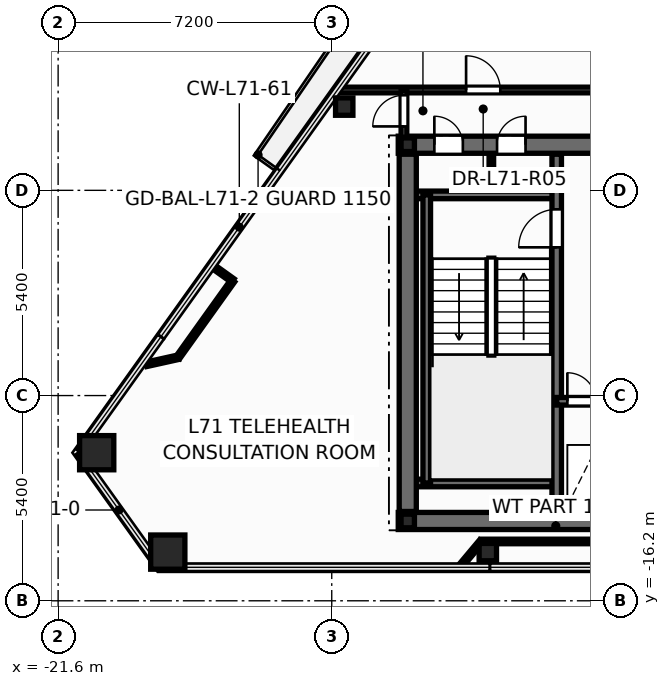
"""IFC4 building model, lengths in metres.
Left out: names, types, materials, properties, quantities, classifications, styles, units other than length and angle.
Written with IfcOpenShell. Run it as: python <this file> out.ifc"""

import sys

from ifc_helpers import new_model, si_unit, direction, frame, frame_2d, origin, origin_2d, place, context, subcontext, project, spatial, rectangle, hollow_rectangle, hollow_circle, i_section, extrude, element, fill, save


model = new_model("IFC4")
c1 = context("Model", 3, precision=1e-05, world=origin(), true_north=direction((0.0, 1.0)))
c2 = subcontext(c1, "Body", "Model", "MODEL_VIEW")
j1 = project(units=[si_unit("LENGTHUNIT", "METRE"), si_unit("PLANEANGLEUNIT", "RADIAN")], contexts=[c1])
p1 = place(None, origin())
s1 = spatial("IfcSite", under=j1, at=p1, CompositionType="ELEMENT")
p2 = place(p1, origin())
s2 = spatial("IfcBuilding", under=s1, at=p2, CompositionType="ELEMENT")
p3 = place(p2, frame((0.0, 0.0, 270.6)))
s3 = spatial("IfcBuildingStorey", under=s2, at=p3, CompositionType="ELEMENT", Elevation=270.6)
for number, where, z_axis, x_axis in (
    (1, (-20.585, -12.303, 0.0), (0.0, 0.0, 1.0), (1.0, 0.0, 0.0)),
    (2, (-18.714, -14.919, 0.0), (0.0, 0.0, 1.0), (1.0, 0.0, 0.0)),
):
    element("IfcColumn", number, at=place(p3, frame(where, z_axis=z_axis, x_axis=x_axis)), inside=s3, PredefinedType="COLUMN", context=c2, shape_type="SweptSolid", body=[
        extrude(hollow_rectangle(XDim=0.9, YDim=0.9, WallThickness=0.04, at=origin_2d()), origin(), (0.0, 0.0, 1.0), 3.6),
    ])
for number, where, z_axis, x_axis in (
    (3, (-10.293, -14.919, 0.0), (0.0, 0.0, 1.0), (1.0, 0.0, 0.0)),
    (4, (-14.072, -3.196, 0.0), (0.0, 0.0, 1.0), (1.0, 0.0, 0.0)),
):
    element("IfcColumn", number, at=place(p3, frame(where, z_axis=z_axis, x_axis=x_axis)), inside=s3, PredefinedType="COLUMN", context=c2, shape_type="SweptSolid", body=[
        extrude(hollow_circle(Radius=0.229, WallThickness=0.016, at=origin_2d()), origin(), (0.0, 0.0, 1.0), 3.6),
    ])
for number, where, z_axis, x_axis in (
    (5, (-12.4, -14.1, 0.0), (0.0, 0.0, 1.0), (1.0, 0.0, 0.0)),
    (6, (-12.4, -4.2, 0.0), (0.0, 0.0, 1.0), (1.0, 0.0, 0.0)),
):
    element("IfcColumn", number, at=place(p3, frame(where, z_axis=z_axis, x_axis=x_axis)), inside=s3, PredefinedType="COLUMN", context=c2, shape_type="SweptSolid", body=[
        extrude(i_section(OverallWidth=0.352, OverallDepth=0.359, WebThickness=0.018, FlangeThickness=0.026, at=origin_2d()), origin(), (0.0, 0.0, 1.0), 3.6),
    ])
p4 = place(p3, frame((-10.2, -5.52, 0.0), z_axis=(0.0, 0.0, 1.0), x_axis=(0.0, 1.0, 0.0)))
e7 = element("IfcWall", 7, at=p4, inside=s3, PredefinedType="PARTITIONING", context=c2, shape_type="SweptSolid", body=[
    extrude(rectangle(XDim=1.12, YDim=0.12, at=frame_2d((0.56, 0.0))), origin(), (0.0, 0.0, 1.0), 3.345),
])
p5 = place(p3, frame((-12.65, -14.1, 0.0), z_axis=(0.0, 0.0, 1.0), x_axis=(1.0, 0.0, 0.0)))
e8 = element("IfcWall", 8, at=p5, inside=s3, PredefinedType="SHEAR", context=c2, shape_type="SweptSolid", body=[
    extrude(rectangle(XDim=25.3, YDim=0.45, at=frame_2d((12.65, 0.0))), origin(), (0.0, 0.0, 1.0), 3.6),
])
p6 = place(p3, frame((-12.65, -4.2, 0.0), z_axis=(0.0, 0.0, 1.0), x_axis=(1.0, 0.0, 0.0)))
e9 = element("IfcWall", 9, at=p6, inside=s3, PredefinedType="SHEAR", context=c2, shape_type="SweptSolid", body=[
    extrude(rectangle(XDim=25.3, YDim=0.45, at=frame_2d((12.65, 0.0))), origin(), (0.0, 0.0, 1.0), 3.6),
])
p7 = place(p6, frame((0.95, 0.0, 0.0)))
e10 = element("IfcOpeningElement", 10, at=p7, cuts=e9, PredefinedType="OPENING", context=c2, shape_type="SweptSolid", body=[
    extrude(rectangle(XDim=0.756, YDim=2.054, at=frame_2d((0.375, 1.027))), frame((0.0, 0.235, 0.0), z_axis=(0.0, -1.0, 0.0), x_axis=(1.0, 0.0, 0.0)), (0.0, 0.0, 1.0), 0.47),
])
p8 = place(p6, frame((2.6, 0.0, 0.0)))
e11 = element("IfcOpeningElement", 11, at=p8, cuts=e9, PredefinedType="OPENING", context=c2, shape_type="SweptSolid", body=[
    extrude(rectangle(XDim=0.756, YDim=2.054, at=frame_2d((0.375, 1.027))), frame((0.0, 0.235, 0.0), z_axis=(0.0, -1.0, 0.0), x_axis=(1.0, 0.0, 0.0)), (0.0, 0.0, 1.0), 0.47),
])
p9 = place(p6, frame((21.85, 0.0, 0.0)))
e12 = element("IfcOpeningElement", 12, at=p9, cuts=e9, PredefinedType="OPENING", context=c2, shape_type="SweptSolid", body=[
    extrude(rectangle(XDim=0.756, YDim=2.054, at=frame_2d((0.375, 1.027))), frame((0.0, 0.235, 0.0), z_axis=(0.0, -1.0, 0.0), x_axis=(1.0, 0.0, 0.0)), (0.0, 0.0, 1.0), 0.47),
])
p10 = place(p6, frame((23.5, 0.0, 0.0)))
e13 = element("IfcOpeningElement", 13, at=p10, cuts=e9, PredefinedType="OPENING", context=c2, shape_type="SweptSolid", body=[
    extrude(rectangle(XDim=0.756, YDim=2.054, at=frame_2d((0.375, 1.027))), frame((0.0, 0.235, 0.0), z_axis=(0.0, -1.0, 0.0), x_axis=(1.0, 0.0, 0.0)), (0.0, 0.0, 1.0), 0.47),
])
p11 = place(p6, frame((5.85, 0.0, 0.0)))
e14 = element("IfcOpeningElement", 14, at=p11, cuts=e9, PredefinedType="OPENING", context=c2, shape_type="SweptSolid", body=[
    extrude(rectangle(XDim=1.006, YDim=2.104, at=frame_2d((0.5, 1.052))), frame((0.0, 0.235, 0.0), z_axis=(0.0, -1.0, 0.0), x_axis=(1.0, 0.0, 0.0)), (0.0, 0.0, 1.0), 0.47),
])
p12 = place(p6, frame((10.35, 0.0, 0.0)))
e15 = element("IfcOpeningElement", 15, at=p12, cuts=e9, PredefinedType="OPENING", context=c2, shape_type="SweptSolid", body=[
    extrude(rectangle(XDim=1.406, YDim=2.154, at=frame_2d((0.7, 1.077))), frame((0.0, 0.235, 0.0), z_axis=(0.0, -1.0, 0.0), x_axis=(1.0, 0.0, 0.0)), (0.0, 0.0, 1.0), 0.47),
])
p13 = place(p6, frame((18.45, 0.0, 0.0)))
e16 = element("IfcOpeningElement", 16, at=p13, cuts=e9, PredefinedType="OPENING", context=c2, shape_type="SweptSolid", body=[
    extrude(rectangle(XDim=1.006, YDim=2.104, at=frame_2d((0.5, 1.052))), frame((0.0, 0.235, 0.0), z_axis=(0.0, -1.0, 0.0), x_axis=(1.0, 0.0, 0.0)), (0.0, 0.0, 1.0), 0.47),
])
for number, where, z_axis, x_axis in (
    (17, (-12.35, -5.52, 0.0), (0.0, 0.0, 1.0), (1.0, 0.0, 0.0)),
    (18, (-12.35, -13.1, 0.0), (0.0, 0.0, 1.0), (1.0, 0.0, 0.0)),
):
    element("IfcWall", number, at=place(p3, frame(where, z_axis=z_axis, x_axis=x_axis)), inside=s3, PredefinedType="SOLIDWALL", context=c2, shape_type="SweptSolid", body=[
        extrude(rectangle(XDim=3.87, YDim=0.2, at=frame_2d((1.935, 0.0))), origin(), (0.0, 0.0, 1.0), 3.6),
    ])
p14 = place(p3, frame((-11.9, -13.1, 0.0), z_axis=(0.0, 0.0, 1.0), x_axis=(0.0, 1.0, 0.0)))
e19 = element("IfcWall", 19, at=p14, inside=s3, PredefinedType="SOLIDWALL", context=c2, shape_type="SweptSolid", body=[
    extrude(rectangle(XDim=7.58, YDim=0.2, at=frame_2d((3.79, 0.0))), origin(), (0.0, 0.0, 1.0), 3.6),
])
p15 = place(p3, frame((-8.48, -13.85, 0.0), z_axis=(0.0, 0.0, 1.0), x_axis=(0.0, 1.0, 0.0)))
e20 = element("IfcWall", 20, at=p15, inside=s3, PredefinedType="SHEAR", context=c2, shape_type="SweptSolid", body=[
    extrude(rectangle(XDim=9.4, YDim=0.25, at=frame_2d((4.7, 0.0))), origin(), (0.0, 0.0, 1.0), 3.6),
])
p16 = place(p15, frame((6.95, 0.0, 0.0)))
e21 = element("IfcOpeningElement", 21, at=p16, cuts=e20, PredefinedType="OPENING", context=c2, shape_type="SweptSolid", body=[
    extrude(rectangle(XDim=1.006, YDim=2.104, at=frame_2d((0.5, 1.052))), frame((0.0, 0.135, 0.0), z_axis=(0.0, -1.0, 0.0), x_axis=(1.0, 0.0, 0.0)), (0.0, 0.0, 1.0), 0.27),
])
p17 = place(p3, frame((-8.48, -10.95, 0.0), z_axis=(0.0, 0.0, 1.0), x_axis=(1.0, 0.0, 0.0)))
e22 = element("IfcWall", 22, at=p17, inside=s3, PredefinedType="SOLIDWALL", context=c2, shape_type="SweptSolid", body=[
    extrude(rectangle(XDim=3.36, YDim=0.2, at=frame_2d((1.68, 0.0))), origin(), (0.0, 0.0, 1.0), 3.6),
])
p18 = place(p17, frame((0.28, 0.0, 0.0)))
e23 = element("IfcOpeningElement", 23, at=p18, cuts=e22, PredefinedType="OPENING", context=c2, shape_type="SweptSolid", body=[
    extrude(rectangle(XDim=0.756, YDim=2.054, at=frame_2d((0.375, 1.027))), frame((0.0, 0.11, 0.0), z_axis=(0.0, -1.0, 0.0), x_axis=(1.0, 0.0, 0.0)), (0.0, 0.0, 1.0), 0.22),
])
p19 = place(p17, frame((1.85, 0.0, 0.0)))
e24 = element("IfcOpeningElement", 24, at=p19, cuts=e22, PredefinedType="OPENING", context=c2, shape_type="SweptSolid", body=[
    extrude(rectangle(XDim=1.106, YDim=2.104, at=frame_2d((0.55, 1.052))), frame((0.0, 0.11, 0.0), z_axis=(0.0, -1.0, 0.0), x_axis=(1.0, 0.0, 0.0)), (0.0, 0.0, 1.0), 0.22),
])
p20 = place(p3, frame((-12.4, -13.85, 0.0), z_axis=(0.0, 0.0, 1.0), x_axis=(0.0, 1.0, 0.0)))
e25 = element("IfcWall", 25, at=p20, inside=s3, PredefinedType="SHEAR", context=c2, shape_type="SweptSolid", body=[
    extrude(rectangle(XDim=9.4, YDim=0.45, at=frame_2d((4.7, 0.0))), origin(), (0.0, 0.0, 1.0), 3.6),
])
p21 = place(p3, frame((-14.251, -2.76, 0.0), z_axis=(0.0, 0.0, 1.0), x_axis=(1.0, 0.0, 0.0)))
e26 = element("IfcWall", 26, at=p21, inside=s3, PredefinedType="PARTITIONING", context=c2, shape_type="SweptSolid", body=[
    extrude(rectangle(XDim=9.351, YDim=0.15, at=frame_2d((4.676, 0.0))), origin(), (0.0, 0.0, 1.0), 2.32),
])
p22 = place(p21, frame((3.386, 0.0, 0.0)))
e27 = element("IfcOpeningElement", 27, at=p22, cuts=e26, PredefinedType="OPENING", context=c2, shape_type="SweptSolid", body=[
    extrude(rectangle(XDim=0.906, YDim=2.104, at=frame_2d((0.45, 1.052))), frame((0.0, 0.085, 0.0), z_axis=(0.0, -1.0, 0.0), x_axis=(1.0, 0.0, 0.0)), (0.0, 0.0, 1.0), 0.17),
])
p23 = place(p3, frame((-10.468, -14.639, 0.0), z_axis=(0.0, 0.0, 1.0), x_axis=(1.0, 0.0, 0.0)))
e28 = element("IfcWall", 28, at=p23, inside=s3, PredefinedType="PARTITIONING", context=c2, shape_type="SweptSolid", body=[
    extrude(rectangle(XDim=3.926, YDim=0.12, at=frame_2d((1.963, 0.0))), origin(), (0.0, 0.0, 1.0), 3.345),
])
p24 = place(p3, frame((-17.003, -7.776, 0.0), z_axis=(0.0, 0.0, 1.0), x_axis=(-0.581731659236, -0.813380769777, 0.0)))
e29 = element("IfcWall", 29, at=p24, inside=s3, PredefinedType="PARTITIONING", context=c2, shape_type="SweptSolid", body=[
    extrude(rectangle(XDim=2.48, YDim=0.12, at=frame_2d((1.24, 0.0))), origin(), (0.0, 0.0, 1.0), 2.32),
])
p25 = place(p3, frame((-12.5, -4.24, 0.0), z_axis=(0.0, 0.0, 1.0), x_axis=(0.0, 1.0, 0.0)))
e30 = element("IfcWall", 30, at=p25, inside=s3, PredefinedType="PARTITIONING", context=c2, shape_type="SweptSolid", body=[
    extrude(rectangle(XDim=1.48, YDim=0.15, at=frame_2d((0.74, 0.0))), origin(), (0.0, 0.0, 1.0), 2.32),
])
p26 = place(p25, frame((0.522, 0.0, 0.0)))
e31 = element("IfcOpeningElement", 31, at=p26, cuts=e30, PredefinedType="OPENING", context=c2, shape_type="SweptSolid", body=[
    extrude(rectangle(XDim=0.826, YDim=2.104, at=frame_2d((0.41, 1.052))), frame((0.0, 0.085, 0.0), z_axis=(0.0, -1.0, 0.0), x_axis=(1.0, 0.0, 0.0)), (0.0, 0.0, 1.0), 0.17),
])
p27 = place(p3, frame((-11.03, -15.309, 0.0), z_axis=(0.0, 0.0, 1.0), x_axis=(0.642543514204, 0.766249197295, 0.0)))
e32 = element("IfcWall", 32, at=p27, inside=s3, PredefinedType="PARTITIONING", context=c2, shape_type="SweptSolid", body=[
    extrude(rectangle(XDim=0.874, YDim=0.12, at=frame_2d((0.437, 0.0))), origin(), (0.0, 0.0, 1.0), 2.863),
])
p28 = place(p3, frame((-18.445, -9.793, 0.0), z_axis=(0.0, 0.0, 1.0), x_axis=(-0.976274708093, -0.216535665279, 0.0)))
e33 = element("IfcWall", 33, at=p28, inside=s3, PredefinedType="PARTITIONING", context=c2, shape_type="SweptSolid", body=[
    extrude(rectangle(XDim=0.851, YDim=0.12, at=frame_2d((0.426, 0.0))), origin(), (0.0, 0.0, 1.0), 2.863),
])
p29 = place(p3, frame((-17.548, -7.386, 0.0), z_axis=(0.0, 0.0, 1.0), x_axis=(0.813265440227, -0.581892879947, 0.0)))
e34 = element("IfcWall", 34, at=p29, inside=s3, PredefinedType="PARTITIONING", context=c2, shape_type="SweptSolid", body=[
    extrude(rectangle(XDim=0.67, YDim=0.12, at=frame_2d((0.335, 0.0))), origin(), (0.0, 0.0, 1.0), 2.863),
])
p30 = place(p16, origin())
e35 = element("IfcDoor", 35, at=p30, inside=s3, OperationType="SINGLE_SWING_LEFT", PredefinedType="DOOR", context=c2, shape_type="SweptSolid", body=[
    extrude(rectangle(XDim=1.0, YDim=2.1, at=frame_2d((0.5, 1.05))), frame((0.0, 0.025, 0.0), z_axis=(0.0, -1.0, 0.0), x_axis=(1.0, 0.0, 0.0)), (0.0, 0.0, 1.0), 0.05),
])
fill(e21, e35)
p31 = place(p18, origin())
e36 = element("IfcDoor", 36, at=p31, inside=s3, OperationType="SINGLE_SWING_LEFT", PredefinedType="DOOR", context=c2, shape_type="SweptSolid", body=[
    extrude(rectangle(XDim=0.75, YDim=2.05, at=frame_2d((0.375, 1.025))), frame((0.0, 0.025, 0.0), z_axis=(0.0, -1.0, 0.0), x_axis=(1.0, 0.0, 0.0)), (0.0, 0.0, 1.0), 0.05),
])
fill(e23, e36)
p32 = place(p7, origin())
e37 = element("IfcDoor", 37, at=p32, inside=s3, OperationType="SINGLE_SWING_LEFT", PredefinedType="DOOR", context=c2, shape_type="SweptSolid", body=[
    extrude(rectangle(XDim=0.75, YDim=2.05, at=frame_2d((0.375, 1.025))), frame((0.0, 0.025, 0.0), z_axis=(0.0, -1.0, 0.0), x_axis=(1.0, 0.0, 0.0)), (0.0, 0.0, 1.0), 0.05),
])
fill(e10, e37)
p33 = place(p8, origin())
e38 = element("IfcDoor", 38, at=p33, inside=s3, OperationType="SINGLE_SWING_RIGHT", PredefinedType="DOOR", context=c2, shape_type="SweptSolid", body=[
    extrude(rectangle(XDim=0.75, YDim=2.05, at=frame_2d((0.375, 1.025))), frame((0.0, 0.025, 0.0), z_axis=(0.0, -1.0, 0.0), x_axis=(1.0, 0.0, 0.0)), (0.0, 0.0, 1.0), 0.05),
])
fill(e11, e38)
p34 = place(p26, origin())
e39 = element("IfcDoor", 39, at=p34, inside=s3, OperationType="SINGLE_SWING_LEFT", PredefinedType="DOOR", context=c2, shape_type="SweptSolid", body=[
    extrude(rectangle(XDim=0.82, YDim=2.1, at=frame_2d((0.41, 1.05))), frame((0.0, 0.025, 0.0), z_axis=(0.0, -1.0, 0.0), x_axis=(1.0, 0.0, 0.0)), (0.0, 0.0, 1.0), 0.05),
])
fill(e31, e39)
p35 = place(p22, origin())
e40 = element("IfcDoor", 40, at=p35, inside=s3, OperationType="SINGLE_SWING_LEFT", PredefinedType="DOOR", context=c2, shape_type="SweptSolid", body=[
    extrude(rectangle(XDim=0.9, YDim=2.1, at=frame_2d((0.45, 1.05))), frame((0.0, 0.025, 0.0), z_axis=(0.0, -1.0, 0.0), x_axis=(1.0, 0.0, 0.0)), (0.0, 0.0, 1.0), 0.05),
])
fill(e27, e40)
save(model, sys.argv[1])
